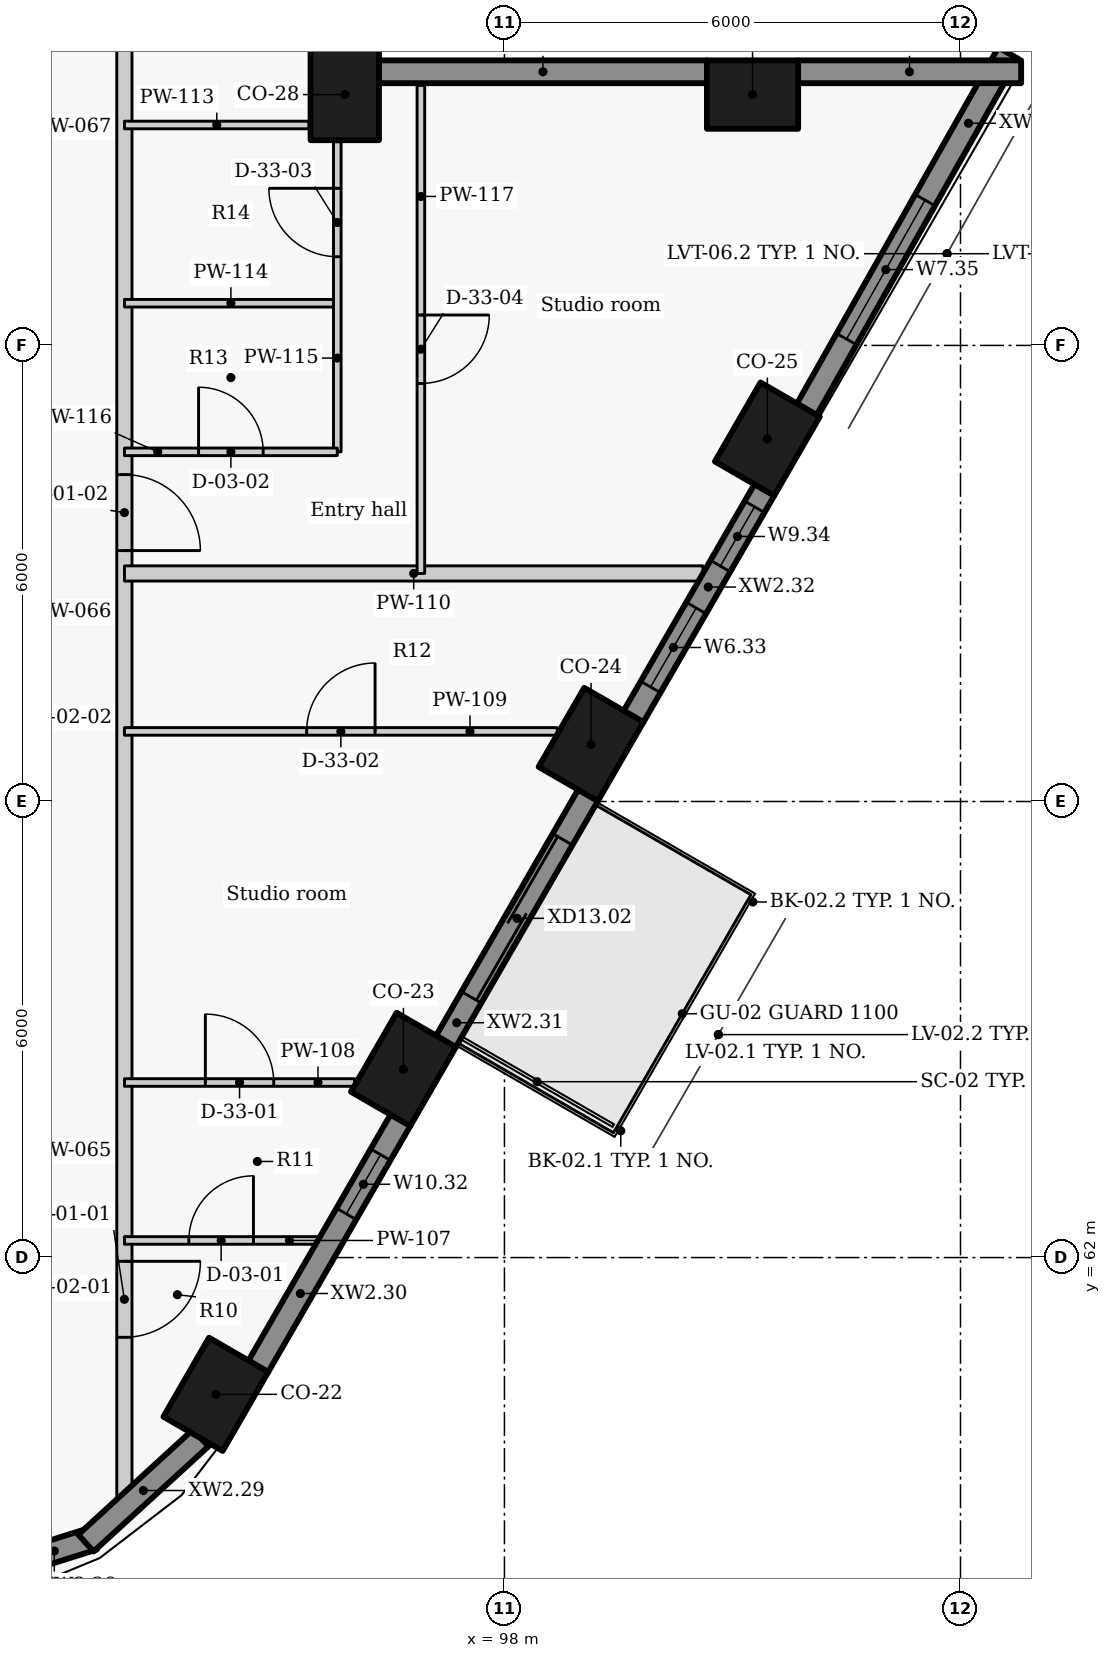
"""IFC4 building model, lengths in metres.
Left out: names, types, materials, properties, quantities, classifications, styles, units other than length and angle.
Written with IfcOpenShell. Run it as: python <this file> out.ifc"""

import sys

from ifc_helpers import new_model, si_unit, direction, frame, frame_2d, origin, origin_2d, place, context, subcontext, project, spatial, rectangle, extrude, element, fill, save


model = new_model("IFC4")
c1 = context("Model", 3, precision=1e-05, world=origin(), true_north=direction((0.0, 1.0)))
c2 = subcontext(c1, "Body", "Model", "MODEL_VIEW")
j1 = project(units=[si_unit("LENGTHUNIT", "METRE"), si_unit("PLANEANGLEUNIT", "RADIAN")], contexts=[c1])
p1 = place(None, origin())
s1 = spatial("IfcSite", under=j1, at=p1, CompositionType="ELEMENT")
p2 = place(p1, origin())
s2 = spatial("IfcBuilding", under=s1, at=p2, CompositionType="ELEMENT")
p3 = place(p2, frame((0.0, 0.0, 213.0)))
s3 = spatial("IfcBuildingStorey", under=s2, at=p3, CompositionType="ELEMENT", Elevation=213.0)
for number, where, z_axis, x_axis in (
    (1, (94.203, 60.2, 0.0), (0.0, 0.0, 1.0), (0.5, 0.866, 0.0)),
    (2, (96.671, 64.475, 0.0), (0.0, 0.0, 1.0), (0.5, 0.866, 0.0)),
    (3, (99.139, 68.75, 0.0), (0.0, 0.0, 1.0), (0.5, 0.866, 0.0)),
    (4, (101.459, 72.768, 0.0), (0.0, 0.0, 1.0), (0.5, 0.866, 0.0)),
    (5, (101.264, 77.3, 0.0), (0.0, 0.0, 1.0), (-1.0, 0.0, 0.0)),
    (6, (95.899, 77.3, 0.0), (0.0, 0.0, 1.0), (0.0, 1.0, 0.0)),
):
    element("IfcColumn", number, at=place(p3, frame(where, z_axis=z_axis, x_axis=x_axis)), inside=s3, PredefinedType="COLUMN", context=c2, shape_type="SweptSolid", body=[
        extrude(rectangle(XDim=1.2, YDim=0.9, at=origin_2d()), origin(), (0.0, 0.0, 1.0), 3.3),
    ])
p4 = place(p3, frame((90.636, 57.685, 0.0), z_axis=(0.0, 0.0, 1.0), x_axis=(0.95368324118, 0.300812691707, 0.0)))
e7 = element("IfcWall", 7, at=p4, inside=s3, PredefinedType="SOLIDWALL", context=c2, shape_type="SweptSolid", body=[
    extrude(rectangle(XDim=2.053, YDim=0.3, at=frame_2d((1.027, 0.0))), origin(), (0.0, 0.0, 1.0), 2.425),
])
p5 = place(p4, frame((0.271, 0.0, 0.9)))
e8 = element("IfcOpeningElement", 8, at=p5, cuts=e7, PredefinedType="OPENING", context=c2, shape_type="SweptSolid", body=[
    extrude(rectangle(XDim=0.6, YDim=1.1, at=frame_2d((0.3, 0.55))), frame((0.0, 0.16, 0.0), z_axis=(0.0, -1.0, 0.0), x_axis=(1.0, 0.0, 0.0)), (0.0, 0.0, 1.0), 0.32),
])
p6 = place(p3, frame((92.494, 58.244, 0.0), z_axis=(0.0, 0.0, 1.0), x_axis=(0.73764876128, 0.675184645102, 0.0)))
e9 = element("IfcWall", 9, at=p6, inside=s3, PredefinedType="SOLIDWALL", context=c2, shape_type="SweptSolid", body=[
    extrude(rectangle(XDim=2.048, YDim=0.3, at=frame_2d((1.024, 0.0))), origin(), (0.0, 0.0, 1.0), 2.425),
])
p7 = place(p3, frame((94.761, 60.567, 0.0), z_axis=(0.0, 0.0, 1.0), x_axis=(0.499982088007, 0.866035745032, 0.0)))
e10 = element("IfcWall", 10, at=p7, inside=s3, PredefinedType="SOLIDWALL", context=c2, shape_type="SweptSolid", body=[
    extrude(rectangle(XDim=3.744, YDim=0.3, at=frame_2d((1.872, 0.0))), origin(), (0.0, 0.0, 1.0), 2.425),
])
p8 = place(p7, frame((2.319, 0.0, 1.5)))
e11 = element("IfcOpeningElement", 11, at=p8, cuts=e10, PredefinedType="OPENING", context=c2, shape_type="SweptSolid", body=[
    extrude(rectangle(XDim=0.9, YDim=0.5, at=frame_2d((0.45, 0.25))), frame((0.0, 0.16, 0.0), z_axis=(0.0, -1.0, 0.0), x_axis=(1.0, 0.0, 0.0)), (0.0, 0.0, 1.0), 0.32),
])
p9 = place(p3, frame((97.229, 64.842, 0.0), z_axis=(0.0, 0.0, 1.0), x_axis=(0.500059225181, 0.86599120741, 0.0)))
e12 = element("IfcWall", 12, at=p9, inside=s3, PredefinedType="SOLIDWALL", context=c2, shape_type="SweptSolid", body=[
    extrude(rectangle(XDim=3.744, YDim=0.3, at=frame_2d((1.872, 0.0))), origin(), (0.0, 0.0, 1.0), 2.425),
])
p10 = place(p9, frame((0.672, 0.0, 0.0)))
e13 = element("IfcOpeningElement", 13, at=p10, cuts=e12, PredefinedType="OPENING", context=c2, shape_type="SweptSolid", body=[
    extrude(rectangle(XDim=2.4, YDim=2.0, at=frame_2d((1.2, 1.0))), frame((0.0, 0.16, 0.0), z_axis=(0.0, -1.0, 0.0), x_axis=(1.0, 0.0, 0.0)), (0.0, 0.0, 1.0), 0.32),
])
p11 = place(p3, frame((99.697, 69.116, 0.0), z_axis=(0.0, 0.0, 1.0), x_axis=(0.499955427682, 0.866051136095, 0.0)))
e14 = element("IfcWall", 14, at=p11, inside=s3, PredefinedType="SOLIDWALL", context=c2, shape_type="SweptSolid", body=[
    extrude(rectangle(XDim=3.447, YDim=0.3, at=frame_2d((1.724, 0.0))), origin(), (0.0, 0.0, 1.0), 2.425),
])
p12 = place(p11, frame((0.45, 0.0, 0.9)))
e15 = element("IfcOpeningElement", 15, at=p12, cuts=e14, PredefinedType="OPENING", context=c2, shape_type="SweptSolid", body=[
    extrude(rectangle(XDim=1.2, YDim=1.1, at=frame_2d((0.6, 0.55))), frame((0.0, 0.16, 0.0), z_axis=(0.0, -1.0, 0.0), x_axis=(1.0, 0.0, 0.0)), (0.0, 0.0, 1.0), 0.32),
])
p13 = place(p11, frame((2.287, 0.0, 0.9)))
e16 = element("IfcOpeningElement", 16, at=p13, cuts=e14, PredefinedType="OPENING", context=c2, shape_type="SweptSolid", body=[
    extrude(rectangle(XDim=0.9, YDim=1.1, at=frame_2d((0.45, 0.55))), frame((0.0, 0.16, 0.0), z_axis=(0.0, -1.0, 0.0), x_axis=(1.0, 0.0, 0.0)), (0.0, 0.0, 1.0), 0.32),
])
p14 = place(p3, frame((101.977, 73.157, 0.0), z_axis=(0.0, 0.0, 1.0), x_axis=(0.492033360928, 0.870576344575, 0.0)))
e17 = element("IfcWall", 17, at=p14, inside=s3, PredefinedType="SOLIDWALL", context=c2, shape_type="SweptSolid", body=[
    extrude(rectangle(XDim=5.387, YDim=0.3, at=frame_2d((2.693, 0.0))), origin(), (0.0, 0.0, 1.0), 2.425),
])
p15 = place(p14, frame((1.064, 0.0, 0.9)))
e18 = element("IfcOpeningElement", 18, at=p15, cuts=e17, PredefinedType="OPENING", context=c2, shape_type="SweptSolid", body=[
    extrude(rectangle(XDim=2.1, YDim=1.1, at=frame_2d((1.05, 0.55))), frame((0.0, 0.16, 0.0), z_axis=(0.0, -1.0, 0.0), x_axis=(1.0, 0.0, 0.0)), (0.0, 0.0, 1.0), 0.32),
])
p16 = place(p3, frame((104.798, 77.6, 0.0), z_axis=(0.0, 0.0, 1.0), x_axis=(-1.0, 0.0, 0.0)))
e19 = element("IfcWall", 19, at=p16, inside=s3, PredefinedType="SOLIDWALL", context=c2, shape_type="SweptSolid", body=[
    extrude(rectangle(XDim=2.938, YDim=0.3, at=frame_2d((1.469, 0.0))), origin(), (0.0, 0.0, 1.0), 2.425),
])
p17 = place(p3, frame((100.668, 77.6, 0.0), z_axis=(0.0, 0.0, 1.0), x_axis=(-1.0, 0.0, 0.0)))
e20 = element("IfcWall", 20, at=p17, inside=s3, PredefinedType="SOLIDWALL", context=c2, shape_type="SweptSolid", body=[
    extrude(rectangle(XDim=4.323, YDim=0.3, at=frame_2d((2.161, 0.0))), origin(), (0.0, 0.0, 1.0), 2.425),
])
p18 = place(p3, frame((93.0, 101.281, 0.0), z_axis=(0.0, 0.0, 1.0), x_axis=(0.0, -1.0, 0.0)))
e21 = element("IfcWall", 21, at=p18, inside=s3, PredefinedType="PARTITIONING", context=c2, shape_type="SweptSolid", body=[
    extrude(rectangle(XDim=42.606, YDim=0.2, at=frame_2d((21.303, 0.0))), origin(), (0.0, 0.0, 1.0), 2.405),
])
p19 = place(p18, frame((39.33, 0.0, 0.0)))
e22 = element("IfcOpeningElement", 22, at=p19, cuts=e21, PredefinedType="OPENING", context=c2, shape_type="SweptSolid", body=[
    extrude(rectangle(XDim=1.0, YDim=2.1, at=frame_2d((0.5, 1.05))), frame((0.0, 0.11, 0.0), z_axis=(0.0, -1.0, 0.0), x_axis=(1.0, 0.0, 0.0)), (0.0, 0.0, 1.0), 0.22),
])
p20 = place(p18, frame((28.98, 0.0, 0.0)))
e23 = element("IfcOpeningElement", 23, at=p20, cuts=e21, PredefinedType="OPENING", context=c2, shape_type="SweptSolid", body=[
    extrude(rectangle(XDim=1.0, YDim=2.1, at=frame_2d((0.5, 1.05))), frame((0.0, 0.11, 0.0), z_axis=(0.0, -1.0, 0.0), x_axis=(1.0, 0.0, 0.0)), (0.0, 0.0, 1.0), 0.22),
])
p21 = place(p18, frame((6.893, 0.0, 0.0)))
e24 = element("IfcOpeningElement", 24, at=p21, cuts=e21, PredefinedType="OPENING", context=c2, shape_type="SweptSolid", body=[
    extrude(rectangle(XDim=1.0, YDim=2.1, at=frame_2d((0.5, 1.05))), frame((0.0, 0.11, 0.0), z_axis=(0.0, -1.0, 0.0), x_axis=(1.0, 0.0, 0.0)), (0.0, 0.0, 1.0), 0.22),
])
p22 = place(p18, frame((19.08, 0.0, 0.0)))
e25 = element("IfcOpeningElement", 25, at=p22, cuts=e21, PredefinedType="OPENING", context=c2, shape_type="SweptSolid", body=[
    extrude(rectangle(XDim=1.0, YDim=2.1, at=frame_2d((0.5, 1.05))), frame((0.0, 0.11, 0.0), z_axis=(0.0, -1.0, 0.0), x_axis=(1.0, 0.0, 0.0)), (0.0, 0.0, 1.0), 0.22),
])
p23 = place(p3, frame((93.001, 62.225, 0.0), z_axis=(0.0, 0.0, 1.0), x_axis=(1.0, 0.0, 0.0)))
e26 = element("IfcWall", 26, at=p23, inside=s3, PredefinedType="PARTITIONING", context=c2, shape_type="SweptSolid", body=[
    extrude(rectangle(XDim=2.544, YDim=0.1, at=frame_2d((1.272, 0.0))), origin(), (0.0, 0.0, 1.0), 2.405),
])
p24 = place(p23, frame((0.847, 0.0, 0.0)))
e27 = element("IfcOpeningElement", 27, at=p24, cuts=e26, PredefinedType="OPENING", context=c2, shape_type="SweptSolid", body=[
    extrude(rectangle(XDim=0.85, YDim=2.1, at=frame_2d((0.425, 1.05))), frame((0.0, 0.06, 0.0), z_axis=(0.0, -1.0, 0.0), x_axis=(1.0, 0.0, 0.0)), (0.0, 0.0, 1.0), 0.12),
])
p25 = place(p3, frame((93.001, 64.303, 0.0), z_axis=(0.0, 0.0, 1.0), x_axis=(1.0, 0.0, 0.0)))
e28 = element("IfcWall", 28, at=p25, inside=s3, PredefinedType="PARTITIONING", context=c2, shape_type="SweptSolid", body=[
    extrude(rectangle(XDim=3.028, YDim=0.1, at=frame_2d((1.514, 0.0))), origin(), (0.0, 0.0, 1.0), 3.025),
])
p26 = place(p25, frame((1.064, 0.0, 0.0)))
e29 = element("IfcOpeningElement", 29, at=p26, cuts=e28, PredefinedType="OPENING", context=c2, shape_type="SweptSolid", body=[
    extrude(rectangle(XDim=0.9, YDim=2.1, at=frame_2d((0.45, 1.05))), frame((0.0, 0.06, 0.0), z_axis=(0.0, -1.0, 0.0), x_axis=(1.0, 0.0, 0.0)), (0.0, 0.0, 1.0), 0.12),
])
p27 = place(p3, frame((93.001, 68.922, 0.0), z_axis=(0.0, 0.0, 1.0), x_axis=(1.0, 0.0, 0.0)))
e30 = element("IfcWall", 30, at=p27, inside=s3, PredefinedType="PARTITIONING", context=c2, shape_type="SweptSolid", body=[
    extrude(rectangle(XDim=5.695, YDim=0.1, at=frame_2d((2.847, 0.0))), origin(), (0.0, 0.0, 1.0), 3.025),
])
p28 = place(p27, frame((2.397, 0.0, 0.0)))
e31 = element("IfcOpeningElement", 31, at=p28, cuts=e30, PredefinedType="OPENING", context=c2, shape_type="SweptSolid", body=[
    extrude(rectangle(XDim=0.9, YDim=2.1, at=frame_2d((0.45, 1.05))), frame((0.0, 0.06, 0.0), z_axis=(0.0, -1.0, 0.0), x_axis=(1.0, 0.0, 0.0)), (0.0, 0.0, 1.0), 0.12),
])
p29 = place(p3, frame((93.001, 71.0, 0.0), z_axis=(0.0, 0.0, 1.0), x_axis=(1.0, 0.0, 0.0)))
e32 = element("IfcWall", 32, at=p29, inside=s3, PredefinedType="PARTITIONING", context=c2, shape_type="SweptSolid", body=[
    extrude(rectangle(XDim=7.61, YDim=0.2, at=frame_2d((3.805, 0.0))), origin(), (0.0, 0.0, 1.0), 2.405),
])
p30 = place(p3, frame((93.001, 76.9, 0.0), z_axis=(0.0, 0.0, 1.0), x_axis=(1.0, 0.0, 0.0)))
e33 = element("IfcWall", 33, at=p30, inside=s3, PredefinedType="PARTITIONING", context=c2, shape_type="SweptSolid", body=[
    extrude(rectangle(XDim=2.428, YDim=0.1, at=frame_2d((1.214, 0.0))), origin(), (0.0, 0.0, 1.0), 3.025),
])
p31 = place(p3, frame((93.001, 74.555, 0.0), z_axis=(0.0, 0.0, 1.0), x_axis=(1.0, 0.0, 0.0)))
e34 = element("IfcWall", 34, at=p31, inside=s3, PredefinedType="PARTITIONING", context=c2, shape_type="SweptSolid", body=[
    extrude(rectangle(XDim=2.8, YDim=0.1, at=frame_2d((1.4, 0.0))), origin(), (0.0, 0.0, 1.0), 3.025),
])
p32 = place(p3, frame((95.801, 72.6, 0.0), z_axis=(0.0, 0.0, 1.0), x_axis=(0.0, 1.0, 0.0)))
e35 = element("IfcWall", 35, at=p32, inside=s3, PredefinedType="PARTITIONING", context=c2, shape_type="SweptSolid", body=[
    extrude(rectangle(XDim=4.08, YDim=0.1, at=frame_2d((2.04, 0.0))), origin(), (0.0, 0.0, 1.0), 3.025),
])
p33 = place(p32, frame((2.567, 0.0, 0.0)))
e36 = element("IfcOpeningElement", 36, at=p33, cuts=e35, PredefinedType="OPENING", context=c2, shape_type="SweptSolid", body=[
    extrude(rectangle(XDim=0.9, YDim=2.1, at=frame_2d((0.45, 1.05))), frame((0.0, 0.06, 0.0), z_axis=(0.0, -1.0, 0.0), x_axis=(1.0, 0.0, 0.0)), (0.0, 0.0, 1.0), 0.12),
])
p34 = place(p3, frame((93.001, 72.6, 0.0), z_axis=(0.0, 0.0, 1.0), x_axis=(1.0, 0.0, 0.0)))
e37 = element("IfcWall", 37, at=p34, inside=s3, PredefinedType="PARTITIONING", context=c2, shape_type="SweptSolid", body=[
    extrude(rectangle(XDim=2.8, YDim=0.1, at=frame_2d((1.4, 0.0))), origin(), (0.0, 0.0, 1.0), 3.025),
])
p35 = place(p34, frame((0.975, 0.0, 0.0)))
e38 = element("IfcOpeningElement", 38, at=p35, cuts=e37, PredefinedType="OPENING", context=c2, shape_type="SweptSolid", body=[
    extrude(rectangle(XDim=0.85, YDim=2.1, at=frame_2d((0.425, 1.05))), frame((0.0, 0.06, 0.0), z_axis=(0.0, -1.0, 0.0), x_axis=(1.0, 0.0, 0.0)), (0.0, 0.0, 1.0), 0.12),
])
p36 = place(p3, frame((96.901, 77.42, 0.0), z_axis=(0.0, 0.0, 1.0), x_axis=(0.0, -1.0, 0.0)))
e39 = element("IfcWall", 39, at=p36, inside=s3, PredefinedType="PARTITIONING", context=c2, shape_type="SweptSolid", body=[
    extrude(rectangle(XDim=6.42, YDim=0.1, at=frame_2d((3.21, 0.0))), origin(), (0.0, 0.0, 1.0), 2.405),
])
p37 = place(p36, frame((3.02, 0.0, 0.0)))
e40 = element("IfcOpeningElement", 40, at=p37, cuts=e39, PredefinedType="OPENING", context=c2, shape_type="SweptSolid", body=[
    extrude(rectangle(XDim=0.9, YDim=2.1, at=frame_2d((0.45, 1.05))), frame((0.0, 0.06, 0.0), z_axis=(0.0, -1.0, 0.0), x_axis=(1.0, 0.0, 0.0)), (0.0, 0.0, 1.0), 0.12),
])
p38 = place(p8, origin())
e41 = element("IfcWindow", 41, at=p38, inside=s3, PartitioningType="SINGLE_PANEL", PredefinedType="WINDOW", context=c2, shape_type="SweptSolid", body=[
    extrude(rectangle(XDim=0.9, YDim=0.5, at=frame_2d((0.45, 0.25))), frame((0.0, 0.03, 0.0), z_axis=(0.0, -1.0, 0.0), x_axis=(1.0, 0.0, 0.0)), (0.0, 0.0, 1.0), 0.06),
])
fill(e11, e41)
p39 = place(p10, origin())
e42 = element("IfcDoor", 42, at=p39, inside=s3, OperationType="DOUBLE_DOOR_SLIDING", PredefinedType="DOOR", context=c2, shape_type="SweptSolid", body=[
    extrude(rectangle(XDim=2.4, YDim=2.0, at=frame_2d((1.2, 1.0))), frame((0.0, 0.025, 0.0), z_axis=(0.0, -1.0, 0.0), x_axis=(1.0, 0.0, 0.0)), (0.0, 0.0, 1.0), 0.05),
])
fill(e13, e42)
p40 = place(p12, origin())
e43 = element("IfcWindow", 43, at=p40, inside=s3, PartitioningType="SINGLE_PANEL", PredefinedType="WINDOW", context=c2, shape_type="SweptSolid", body=[
    extrude(rectangle(XDim=1.2, YDim=1.1, at=frame_2d((0.6, 0.55))), frame((0.0, 0.03, 0.0), z_axis=(0.0, -1.0, 0.0), x_axis=(1.0, 0.0, 0.0)), (0.0, 0.0, 1.0), 0.06),
])
fill(e15, e43)
p41 = place(p13, origin())
e44 = element("IfcWindow", 44, at=p41, inside=s3, PartitioningType="SINGLE_PANEL", PredefinedType="WINDOW", context=c2, shape_type="SweptSolid", body=[
    extrude(rectangle(XDim=0.9, YDim=1.1, at=frame_2d((0.45, 0.55))), frame((0.0, 0.03, 0.0), z_axis=(0.0, -1.0, 0.0), x_axis=(1.0, 0.0, 0.0)), (0.0, 0.0, 1.0), 0.06),
])
fill(e16, e44)
p42 = place(p15, origin())
e45 = element("IfcWindow", 45, at=p42, inside=s3, PartitioningType="SINGLE_PANEL", PredefinedType="WINDOW", context=c2, shape_type="SweptSolid", body=[
    extrude(rectangle(XDim=2.1, YDim=1.1, at=frame_2d((1.05, 0.55))), frame((0.0, 0.03, 0.0), z_axis=(0.0, -1.0, 0.0), x_axis=(1.0, 0.0, 0.0)), (0.0, 0.0, 1.0), 0.06),
])
fill(e18, e45)
p43 = place(p19, origin())
e46 = element("IfcDoor", 46, at=p43, inside=s3, OperationType="SINGLE_SWING_LEFT", PredefinedType="DOOR", context=c2, shape_type="SweptSolid", body=[
    extrude(rectangle(XDim=1.0, YDim=2.1, at=frame_2d((0.5, 1.05))), frame((0.0, 0.025, 0.0), z_axis=(0.0, -1.0, 0.0), x_axis=(1.0, 0.0, 0.0)), (0.0, 0.0, 1.0), 0.05),
])
fill(e22, e46)
p44 = place(p24, origin())
e47 = element("IfcDoor", 47, at=p44, inside=s3, OperationType="SINGLE_SWING_RIGHT", PredefinedType="DOOR", context=c2, shape_type="SweptSolid", body=[
    extrude(rectangle(XDim=0.85, YDim=2.1, at=frame_2d((0.425, 1.05))), frame((0.0, 0.025, 0.0), z_axis=(0.0, -1.0, 0.0), x_axis=(1.0, 0.0, 0.0)), (0.0, 0.0, 1.0), 0.05),
])
fill(e27, e47)
p45 = place(p26, origin())
e48 = element("IfcDoor", 48, at=p45, inside=s3, OperationType="SINGLE_SWING_LEFT", PredefinedType="DOOR", context=c2, shape_type="SweptSolid", body=[
    extrude(rectangle(XDim=0.9, YDim=2.1, at=frame_2d((0.45, 1.05))), frame((0.0, 0.025, 0.0), z_axis=(0.0, -1.0, 0.0), x_axis=(1.0, 0.0, 0.0)), (0.0, 0.0, 1.0), 0.05),
])
fill(e29, e48)
p46 = place(p28, origin())
e49 = element("IfcDoor", 49, at=p46, inside=s3, OperationType="SINGLE_SWING_RIGHT", PredefinedType="DOOR", context=c2, shape_type="SweptSolid", body=[
    extrude(rectangle(XDim=0.9, YDim=2.1, at=frame_2d((0.45, 1.05))), frame((0.0, 0.025, 0.0), z_axis=(0.0, -1.0, 0.0), x_axis=(1.0, 0.0, 0.0)), (0.0, 0.0, 1.0), 0.05),
])
fill(e31, e49)
p47 = place(p20, origin())
e50 = element("IfcDoor", 50, at=p47, inside=s3, OperationType="SINGLE_SWING_RIGHT", PredefinedType="DOOR", context=c2, shape_type="SweptSolid", body=[
    extrude(rectangle(XDim=1.0, YDim=2.1, at=frame_2d((0.5, 1.05))), frame((0.0, 0.025, 0.0), z_axis=(0.0, -1.0, 0.0), x_axis=(1.0, 0.0, 0.0)), (0.0, 0.0, 1.0), 0.05),
])
fill(e23, e50)
p48 = place(p35, origin())
e51 = element("IfcDoor", 51, at=p48, inside=s3, OperationType="SINGLE_SWING_LEFT", PredefinedType="DOOR", context=c2, shape_type="SweptSolid", body=[
    extrude(rectangle(XDim=0.85, YDim=2.1, at=frame_2d((0.425, 1.05))), frame((0.0, 0.025, 0.0), z_axis=(0.0, -1.0, 0.0), x_axis=(1.0, 0.0, 0.0)), (0.0, 0.0, 1.0), 0.05),
])
fill(e38, e51)
p49 = place(p33, origin())
e52 = element("IfcDoor", 52, at=p49, inside=s3, OperationType="SINGLE_SWING_RIGHT", PredefinedType="DOOR", context=c2, shape_type="SweptSolid", body=[
    extrude(rectangle(XDim=0.9, YDim=2.1, at=frame_2d((0.45, 1.05))), frame((0.0, 0.025, 0.0), z_axis=(0.0, -1.0, 0.0), x_axis=(1.0, 0.0, 0.0)), (0.0, 0.0, 1.0), 0.05),
])
fill(e36, e52)
p50 = place(p37, origin())
e53 = element("IfcDoor", 53, at=p50, inside=s3, OperationType="SINGLE_SWING_LEFT", PredefinedType="DOOR", context=c2, shape_type="SweptSolid", body=[
    extrude(rectangle(XDim=0.9, YDim=2.1, at=frame_2d((0.45, 1.05))), frame((0.0, 0.025, 0.0), z_axis=(0.0, -1.0, 0.0), x_axis=(1.0, 0.0, 0.0)), (0.0, 0.0, 1.0), 0.05),
])
fill(e40, e53)
save(model, sys.argv[1])
